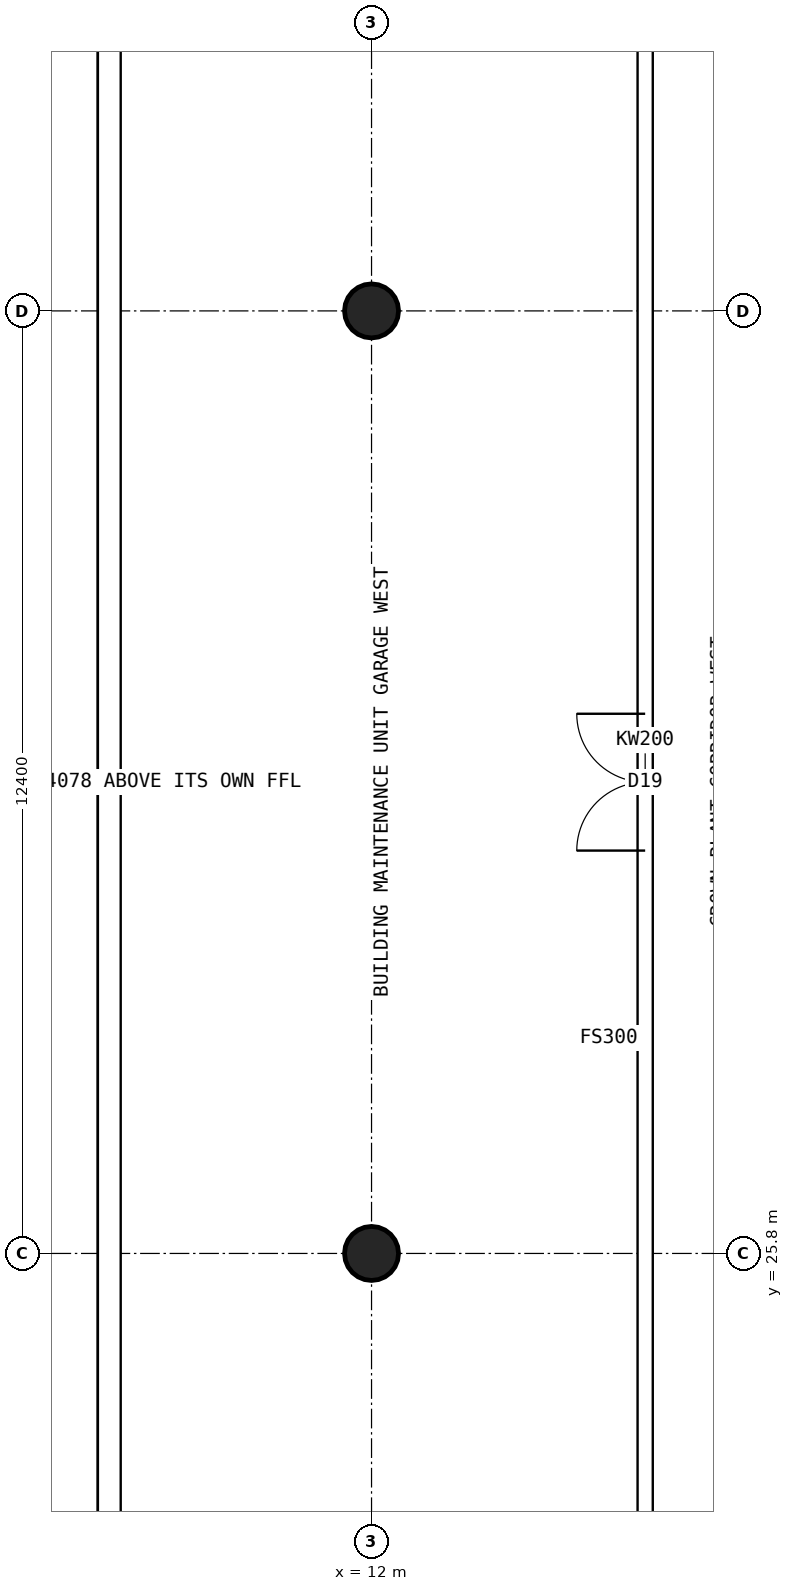
"""IFC4 building model, lengths in metres.
Left out: names, types, materials, properties, quantities, classifications, styles, units other than length and angle.
Written with IfcOpenShell. Run it as: python <this file> out.ifc"""

import sys

from ifc_helpers import new_model, si_unit, direction, frame, frame_2d, origin, origin_2d, place, context, subcontext, project, spatial, polyline, rectangle, hollow_circle, outline, extrude, clip, halfspace, element, fill, save


model = new_model("IFC4")
c1 = context("Model", 3, precision=1e-05, world=origin(), true_north=direction((0.0, 1.0)))
c2 = subcontext(c1, "Body", "Model", "MODEL_VIEW")
j1 = project(units=[si_unit("LENGTHUNIT", "METRE"), si_unit("PLANEANGLEUNIT", "RADIAN")], contexts=[c1])
p1 = place(None, origin())
s1 = spatial("IfcSite", under=j1, at=p1, CompositionType="ELEMENT")
p2 = place(p1, origin())
s2 = spatial("IfcBuilding", under=s1, at=p2, CompositionType="ELEMENT")
p3 = place(p2, frame((0.0, 0.0, 262.3)))
s3 = spatial("IfcBuildingStorey", under=s2, at=p3, CompositionType="ELEMENT", Elevation=262.3)
p4 = place(p3, frame((12.0, 25.8, 0.0), z_axis=(0.0, 0.0, 1.0), x_axis=(1.0, 0.0, 0.0)))
e1 = element("IfcColumn", 1, at=p4, inside=s3, PredefinedType="COLUMN", context=c2, shape_type="SweptSolid", body=[
    extrude(hollow_circle(Radius=0.355, WallThickness=0.025, at=origin_2d()), origin(), (0.0, 0.0, 1.0), 8.433),
])
p5 = place(p3, frame((12.0, 38.2, 0.0), z_axis=(0.0, 0.0, 1.0), x_axis=(1.0, 0.0, 0.0)))
e2 = element("IfcColumn", 2, at=p5, inside=s3, PredefinedType="COLUMN", context=c2, shape_type="SweptSolid", body=[
    extrude(hollow_circle(Radius=0.355, WallThickness=0.025, at=origin_2d()), origin(), (0.0, 0.0, 1.0), 11.524),
])
p6 = place(p3, frame((8.55, 44.2, 0.0), z_axis=(0.0, 0.0, 1.0), x_axis=(0.0, -1.0, 0.0)))
e3 = element("IfcWall", 3, at=p6, inside=s3, PredefinedType="SOLIDWALL", context=c2, shape_type="Clipping", body=[
    clip(clip(extrude(outline(polyline([(-0.025, 0.0), (24.425, 0.0), (24.425, 7.988), (-0.025, 14.084), (-0.025, 0.0)])), frame((0.0, 0.15, 0.0), z_axis=(0.0, -1.0, 0.0), x_axis=(1.0, 0.0, 0.0)), (0.0, 0.0, 1.0), 0.3), halfspace(frame((0.0, 0.0, 0.0), z_axis=(-0.995184726707, 0.098017139978, 0.0)), False)), halfspace(frame((24.4, 0.0, 0.0), z_axis=(0.995184726707, 0.098017139978, 0.0)), False)),
])
p7 = place(p3, frame((15.6, 18.0, 0.0), z_axis=(0.0, 0.0, 1.0), x_axis=(0.0, 1.0, 0.0)))
e4 = element("IfcWall", 4, at=p7, inside=s3, PredefinedType="SOLIDWALL", context=c2, shape_type="SweptSolid", body=[
    extrude(rectangle(XDim=28.0, YDim=0.2, at=frame_2d((14.0, 0.0))), origin(), (0.0, 0.0, 1.0), 6.0),
])
p8 = place(p7, frame((13.1, 0.0, 0.0)))
e5 = element("IfcOpeningElement", 5, at=p8, cuts=e4, PredefinedType="OPENING", context=c2, shape_type="SweptSolid", body=[
    extrude(rectangle(XDim=1.8, YDim=2.1, at=frame_2d((0.9, 1.05))), frame((0.0, 0.11, 0.0), z_axis=(0.0, -1.0, 0.0), x_axis=(1.0, 0.0, 0.0)), (0.0, 0.0, 1.0), 0.22),
])
p9 = place(p7, frame((0.6, 0.0, 0.0)))
e6 = element("IfcOpeningElement", 6, at=p9, cuts=e4, PredefinedType="OPENING", context=c2, shape_type="SweptSolid", body=[
    extrude(rectangle(XDim=1.2, YDim=2.1, at=frame_2d((0.6, 1.05))), frame((0.0, 0.11, 0.0), z_axis=(0.0, -1.0, 0.0), x_axis=(1.0, 0.0, 0.0)), (0.0, 0.0, 1.0), 0.22),
])
p10 = place(p7, frame((26.2, 0.0, 0.0)))
e7 = element("IfcOpeningElement", 7, at=p10, cuts=e4, PredefinedType="OPENING", context=c2, shape_type="SweptSolid", body=[
    extrude(rectangle(XDim=1.2, YDim=2.1, at=frame_2d((0.6, 1.05))), frame((0.0, 0.11, 0.0), z_axis=(0.0, -1.0, 0.0), x_axis=(1.0, 0.0, 0.0)), (0.0, 0.0, 1.0), 0.22),
])
p11 = place(p8, origin())
e8 = element("IfcDoor", 8, at=p11, inside=s3, OperationType="DOUBLE_DOOR_SINGLE_SWING", PredefinedType="DOOR", context=c2, shape_type="SweptSolid", body=[
    extrude(rectangle(XDim=1.8, YDim=2.1, at=frame_2d((0.9, 1.05))), frame((0.0, 0.025, 0.0), z_axis=(0.0, -1.0, 0.0), x_axis=(1.0, 0.0, 0.0)), (0.0, 0.0, 1.0), 0.05),
])
fill(e5, e8)
save(model, sys.argv[1])
